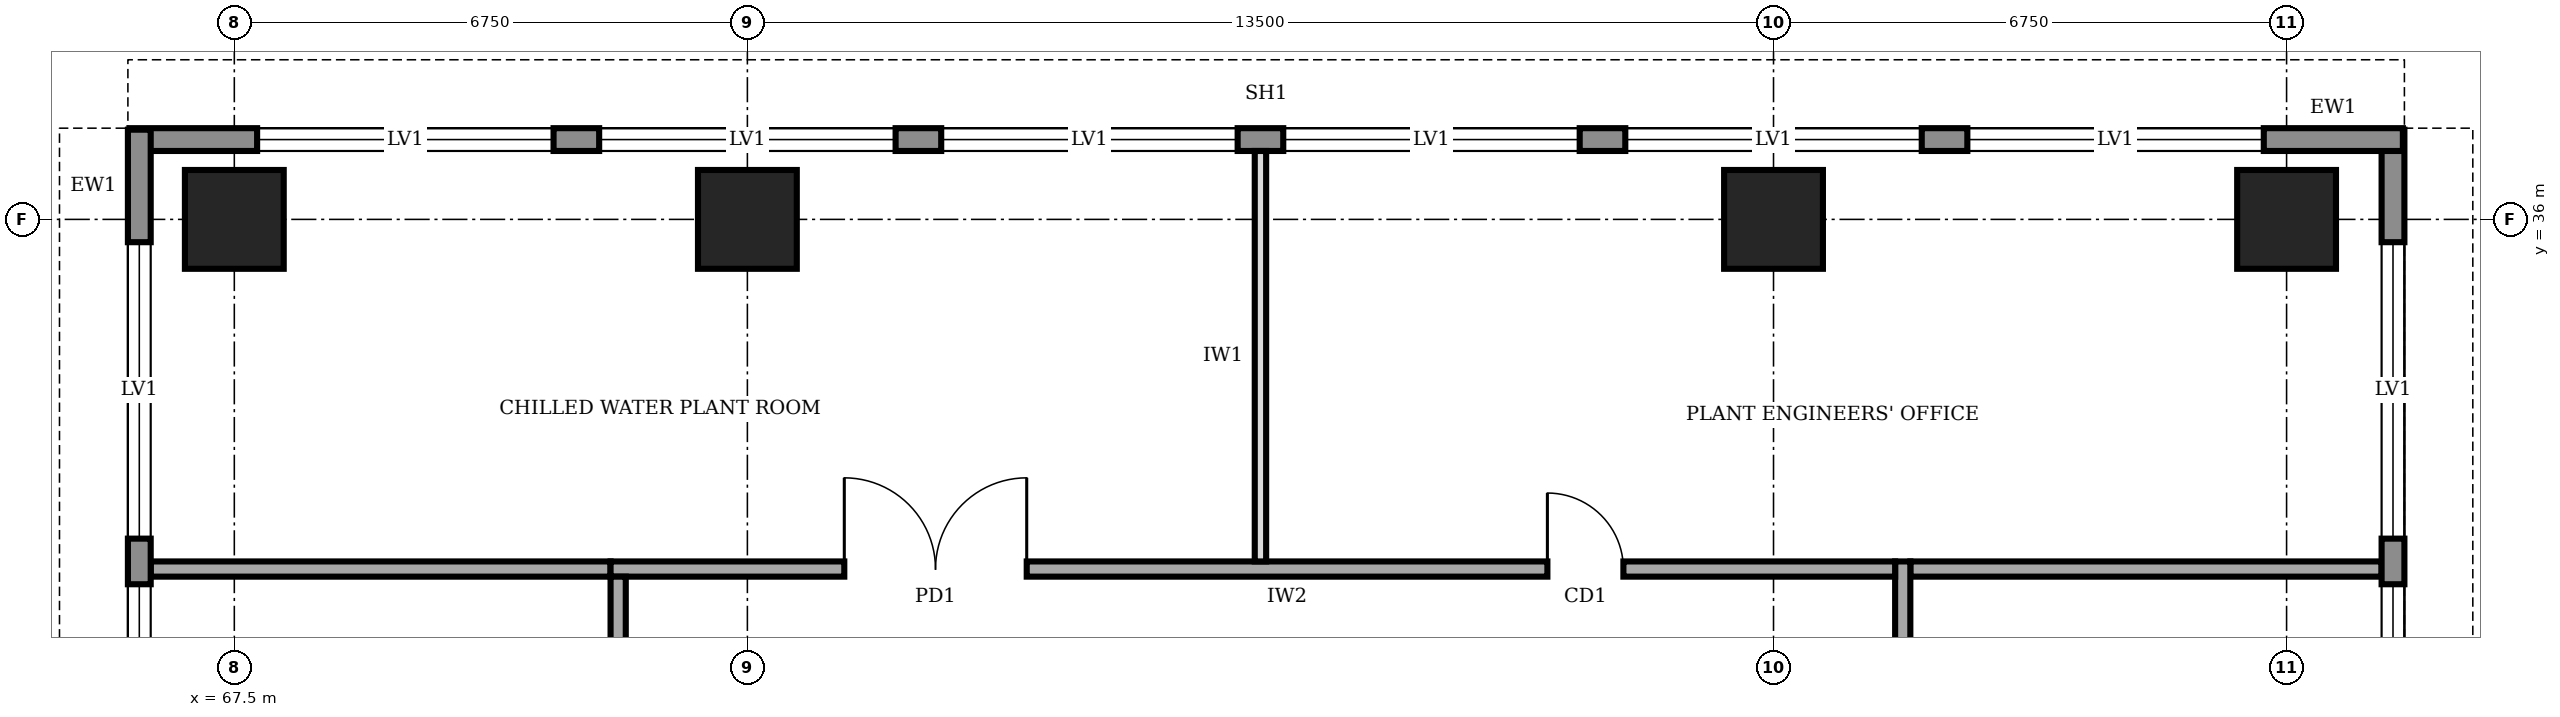
"""IFC4 building model, lengths in metres.
Left out: names, types, materials, properties, quantities, classifications, styles, units other than length and angle.
Written with IfcOpenShell. Run it as: python <this file> out.ifc"""

import sys

from ifc_helpers import new_model, si_unit, direction, frame, frame_2d, origin, origin_2d, place, context, subcontext, project, spatial, rectangle, extrude, element, fill, save


model = new_model("IFC4")
c1 = context("Model", 3, precision=1e-05, world=origin(), true_north=direction((0.0, 1.0)))
c2 = subcontext(c1, "Body", "Model", "MODEL_VIEW")
j1 = project(units=[si_unit("LENGTHUNIT", "METRE"), si_unit("PLANEANGLEUNIT", "RADIAN")], contexts=[c1])
p1 = place(None, origin())
s1 = spatial("IfcSite", under=j1, at=p1, CompositionType="ELEMENT")
p2 = place(p1, origin())
s2 = spatial("IfcBuilding", under=s1, at=p2, CompositionType="ELEMENT")
p3 = place(p2, frame((0.0, 0.0, 229.0)))
s3 = spatial("IfcBuildingStorey", under=s2, at=p3, CompositionType="ELEMENT", Elevation=229.0)
for number, where, z_axis, x_axis in (
    (1, (67.5, 36.0, 0.0), (0.0, 0.0, 1.0), (1.0, 0.0, 0.0)),
    (2, (74.25, 36.0, 0.0), (0.0, 0.0, 1.0), (1.0, 0.0, 0.0)),
    (3, (87.75, 36.0, 0.0), (0.0, 0.0, 1.0), (1.0, 0.0, 0.0)),
    (4, (94.5, 36.0, 0.0), (0.0, 0.0, 1.0), (1.0, 0.0, 0.0)),
):
    element("IfcColumn", number, at=place(p3, frame(where, z_axis=z_axis, x_axis=x_axis)), inside=s3, PredefinedType="COLUMN", context=c2, shape_type="SweptSolid", body=[
        extrude(rectangle(XDim=1.3, YDim=1.3, at=origin_2d()), origin(), (0.0, 0.0, 1.0), 4.0),
    ])
p4 = place(p3, frame((95.9, 3.32, 0.0), z_axis=(0.0, 0.0, 1.0), x_axis=(0.0, 1.0, 0.0)))
e5 = element("IfcWall", 5, at=p4, inside=s3, PredefinedType="STANDARD", context=c2, shape_type="SweptSolid", body=[
    extrude(rectangle(XDim=33.86, YDim=0.3, at=frame_2d((16.93, 0.0))), origin(), (0.0, 0.0, 1.0), 3.75),
])
p5 = place(p4, frame((1.48, 0.0, 0.9)))
e6 = element("IfcOpeningElement", 6, at=p5, cuts=e5, PredefinedType="OPENING", context=c2, shape_type="SweptSolid", body=[
    extrude(rectangle(XDim=3.9, YDim=2.2, at=frame_2d((1.95, 1.1))), frame((0.0, 0.16, 0.0), z_axis=(0.0, -1.0, 0.0), x_axis=(1.0, 0.0, 0.0)), (0.0, 0.0, 1.0), 0.32),
])
p6 = place(p4, frame((5.98, 0.0, 0.9)))
e7 = element("IfcOpeningElement", 7, at=p6, cuts=e5, PredefinedType="OPENING", context=c2, shape_type="SweptSolid", body=[
    extrude(rectangle(XDim=3.9, YDim=2.2, at=frame_2d((1.95, 1.1))), frame((0.0, 0.16, 0.0), z_axis=(0.0, -1.0, 0.0), x_axis=(1.0, 0.0, 0.0)), (0.0, 0.0, 1.0), 0.32),
])
p7 = place(p4, frame((10.48, 0.0, 0.9)))
e8 = element("IfcOpeningElement", 8, at=p7, cuts=e5, PredefinedType="OPENING", context=c2, shape_type="SweptSolid", body=[
    extrude(rectangle(XDim=3.9, YDim=2.2, at=frame_2d((1.95, 1.1))), frame((0.0, 0.16, 0.0), z_axis=(0.0, -1.0, 0.0), x_axis=(1.0, 0.0, 0.0)), (0.0, 0.0, 1.0), 0.32),
])
p8 = place(p4, frame((14.98, 0.0, 0.9)))
e9 = element("IfcOpeningElement", 9, at=p8, cuts=e5, PredefinedType="OPENING", context=c2, shape_type="SweptSolid", body=[
    extrude(rectangle(XDim=3.9, YDim=2.2, at=frame_2d((1.95, 1.1))), frame((0.0, 0.16, 0.0), z_axis=(0.0, -1.0, 0.0), x_axis=(1.0, 0.0, 0.0)), (0.0, 0.0, 1.0), 0.32),
])
p9 = place(p4, frame((19.48, 0.0, 0.9)))
e10 = element("IfcOpeningElement", 10, at=p9, cuts=e5, PredefinedType="OPENING", context=c2, shape_type="SweptSolid", body=[
    extrude(rectangle(XDim=3.9, YDim=2.2, at=frame_2d((1.95, 1.1))), frame((0.0, 0.16, 0.0), z_axis=(0.0, -1.0, 0.0), x_axis=(1.0, 0.0, 0.0)), (0.0, 0.0, 1.0), 0.32),
])
p10 = place(p4, frame((23.98, 0.0, 0.9)))
e11 = element("IfcOpeningElement", 11, at=p10, cuts=e5, PredefinedType="OPENING", context=c2, shape_type="SweptSolid", body=[
    extrude(rectangle(XDim=3.9, YDim=2.2, at=frame_2d((1.95, 1.1))), frame((0.0, 0.16, 0.0), z_axis=(0.0, -1.0, 0.0), x_axis=(1.0, 0.0, 0.0)), (0.0, 0.0, 1.0), 0.32),
])
p11 = place(p4, frame((28.48, 0.0, 0.9)))
e12 = element("IfcOpeningElement", 12, at=p11, cuts=e5, PredefinedType="OPENING", context=c2, shape_type="SweptSolid", body=[
    extrude(rectangle(XDim=3.9, YDim=2.2, at=frame_2d((1.95, 1.1))), frame((0.0, 0.16, 0.0), z_axis=(0.0, -1.0, 0.0), x_axis=(1.0, 0.0, 0.0)), (0.0, 0.0, 1.0), 0.32),
])
p12 = place(p3, frame((96.03, 37.05, 0.0), z_axis=(0.0, 0.0, 1.0), x_axis=(-1.0, 0.0, 0.0)))
e13 = element("IfcWall", 13, at=p12, inside=s3, PredefinedType="STANDARD", context=c2, shape_type="SweptSolid", body=[
    extrude(rectangle(XDim=29.91, YDim=0.3, at=frame_2d((14.955, 0.0))), origin(), (0.0, 0.0, 1.0), 3.75),
])
p13 = place(p12, frame((24.33, 0.0, 0.9)))
e14 = element("IfcOpeningElement", 14, at=p13, cuts=e13, PredefinedType="OPENING", context=c2, shape_type="SweptSolid", body=[
    extrude(rectangle(XDim=3.9, YDim=2.2, at=frame_2d((1.95, 1.1))), frame((0.0, 0.16, 0.0), z_axis=(0.0, -1.0, 0.0), x_axis=(1.0, 0.0, 0.0)), (0.0, 0.0, 1.0), 0.32),
])
p14 = place(p12, frame((19.83, 0.0, 0.9)))
e15 = element("IfcOpeningElement", 15, at=p14, cuts=e13, PredefinedType="OPENING", context=c2, shape_type="SweptSolid", body=[
    extrude(rectangle(XDim=3.9, YDim=2.2, at=frame_2d((1.95, 1.1))), frame((0.0, 0.16, 0.0), z_axis=(0.0, -1.0, 0.0), x_axis=(1.0, 0.0, 0.0)), (0.0, 0.0, 1.0), 0.32),
])
p15 = place(p12, frame((15.33, 0.0, 0.9)))
e16 = element("IfcOpeningElement", 16, at=p15, cuts=e13, PredefinedType="OPENING", context=c2, shape_type="SweptSolid", body=[
    extrude(rectangle(XDim=3.9, YDim=2.2, at=frame_2d((1.95, 1.1))), frame((0.0, 0.16, 0.0), z_axis=(0.0, -1.0, 0.0), x_axis=(1.0, 0.0, 0.0)), (0.0, 0.0, 1.0), 0.32),
])
p16 = place(p12, frame((10.83, 0.0, 0.9)))
e17 = element("IfcOpeningElement", 17, at=p16, cuts=e13, PredefinedType="OPENING", context=c2, shape_type="SweptSolid", body=[
    extrude(rectangle(XDim=3.9, YDim=2.2, at=frame_2d((1.95, 1.1))), frame((0.0, 0.16, 0.0), z_axis=(0.0, -1.0, 0.0), x_axis=(1.0, 0.0, 0.0)), (0.0, 0.0, 1.0), 0.32),
])
p17 = place(p12, frame((6.33, 0.0, 0.9)))
e18 = element("IfcOpeningElement", 18, at=p17, cuts=e13, PredefinedType="OPENING", context=c2, shape_type="SweptSolid", body=[
    extrude(rectangle(XDim=3.9, YDim=2.2, at=frame_2d((1.95, 1.1))), frame((0.0, 0.16, 0.0), z_axis=(0.0, -1.0, 0.0), x_axis=(1.0, 0.0, 0.0)), (0.0, 0.0, 1.0), 0.32),
])
p18 = place(p12, frame((1.83, 0.0, 0.9)))
e19 = element("IfcOpeningElement", 19, at=p18, cuts=e13, PredefinedType="OPENING", context=c2, shape_type="SweptSolid", body=[
    extrude(rectangle(XDim=3.9, YDim=2.2, at=frame_2d((1.95, 1.1))), frame((0.0, 0.16, 0.0), z_axis=(0.0, -1.0, 0.0), x_axis=(1.0, 0.0, 0.0)), (0.0, 0.0, 1.0), 0.32),
])
p19 = place(p3, frame((66.25, 37.18, 0.0), z_axis=(0.0, 0.0, 1.0), x_axis=(0.0, -1.0, 0.0)))
e20 = element("IfcWall", 20, at=p19, inside=s3, PredefinedType="STANDARD", context=c2, shape_type="SweptSolid", body=[
    extrude(rectangle(XDim=33.86, YDim=0.3, at=frame_2d((16.93, 0.0))), origin(), (0.0, 0.0, 1.0), 3.75),
])
p20 = place(p19, frame((28.48, 0.0, 0.9)))
e21 = element("IfcOpeningElement", 21, at=p20, cuts=e20, PredefinedType="OPENING", context=c2, shape_type="SweptSolid", body=[
    extrude(rectangle(XDim=3.9, YDim=2.2, at=frame_2d((1.95, 1.1))), frame((0.0, 0.16, 0.0), z_axis=(0.0, -1.0, 0.0), x_axis=(1.0, 0.0, 0.0)), (0.0, 0.0, 1.0), 0.32),
])
p21 = place(p19, frame((23.98, 0.0, 0.9)))
e22 = element("IfcOpeningElement", 22, at=p21, cuts=e20, PredefinedType="OPENING", context=c2, shape_type="SweptSolid", body=[
    extrude(rectangle(XDim=3.9, YDim=2.2, at=frame_2d((1.95, 1.1))), frame((0.0, 0.16, 0.0), z_axis=(0.0, -1.0, 0.0), x_axis=(1.0, 0.0, 0.0)), (0.0, 0.0, 1.0), 0.32),
])
p22 = place(p19, frame((19.48, 0.0, 0.9)))
e23 = element("IfcOpeningElement", 23, at=p22, cuts=e20, PredefinedType="OPENING", context=c2, shape_type="SweptSolid", body=[
    extrude(rectangle(XDim=3.9, YDim=2.2, at=frame_2d((1.95, 1.1))), frame((0.0, 0.16, 0.0), z_axis=(0.0, -1.0, 0.0), x_axis=(1.0, 0.0, 0.0)), (0.0, 0.0, 1.0), 0.32),
])
p23 = place(p19, frame((14.98, 0.0, 0.9)))
e24 = element("IfcOpeningElement", 24, at=p23, cuts=e20, PredefinedType="OPENING", context=c2, shape_type="SweptSolid", body=[
    extrude(rectangle(XDim=3.9, YDim=2.2, at=frame_2d((1.95, 1.1))), frame((0.0, 0.16, 0.0), z_axis=(0.0, -1.0, 0.0), x_axis=(1.0, 0.0, 0.0)), (0.0, 0.0, 1.0), 0.32),
])
p24 = place(p19, frame((10.48, 0.0, 0.9)))
e25 = element("IfcOpeningElement", 25, at=p24, cuts=e20, PredefinedType="OPENING", context=c2, shape_type="SweptSolid", body=[
    extrude(rectangle(XDim=3.9, YDim=2.2, at=frame_2d((1.95, 1.1))), frame((0.0, 0.16, 0.0), z_axis=(0.0, -1.0, 0.0), x_axis=(1.0, 0.0, 0.0)), (0.0, 0.0, 1.0), 0.32),
])
p25 = place(p19, frame((5.98, 0.0, 0.9)))
e26 = element("IfcOpeningElement", 26, at=p25, cuts=e20, PredefinedType="OPENING", context=c2, shape_type="SweptSolid", body=[
    extrude(rectangle(XDim=3.9, YDim=2.2, at=frame_2d((1.95, 1.1))), frame((0.0, 0.16, 0.0), z_axis=(0.0, -1.0, 0.0), x_axis=(1.0, 0.0, 0.0)), (0.0, 0.0, 1.0), 0.32),
])
p26 = place(p19, frame((1.48, 0.0, 0.9)))
e27 = element("IfcOpeningElement", 27, at=p26, cuts=e20, PredefinedType="OPENING", context=c2, shape_type="SweptSolid", body=[
    extrude(rectangle(XDim=3.9, YDim=2.2, at=frame_2d((1.95, 1.1))), frame((0.0, 0.16, 0.0), z_axis=(0.0, -1.0, 0.0), x_axis=(1.0, 0.0, 0.0)), (0.0, 0.0, 1.0), 0.32),
])
p27 = place(p3, frame((89.45, 9.2, 0.0), z_axis=(0.0, 0.0, 1.0), x_axis=(0.0, 1.0, 0.0)))
e28 = element("IfcWall", 28, at=p27, inside=s3, PredefinedType="SOLIDWALL", context=c2, shape_type="SweptSolid", body=[
    extrude(rectangle(XDim=22.3, YDim=0.2, at=frame_2d((11.15, 0.0))), origin(), (0.0, 0.0, 1.0), 3.75),
])
p28 = place(p27, frame((1.55, 0.0, 0.0)))
e29 = element("IfcOpeningElement", 29, at=p28, cuts=e28, PredefinedType="OPENING", context=c2, shape_type="SweptSolid", body=[
    extrude(rectangle(XDim=1.0, YDim=2.1, at=frame_2d((0.5, 1.05))), frame((0.0, 0.11, 0.0), z_axis=(0.0, -1.0, 0.0), x_axis=(1.0, 0.0, 0.0)), (0.0, 0.0, 1.0), 0.22),
])
p29 = place(p27, frame((5.75, 0.0, 0.0)))
e30 = element("IfcOpeningElement", 30, at=p29, cuts=e28, PredefinedType="OPENING", context=c2, shape_type="SweptSolid", body=[
    extrude(rectangle(XDim=0.9, YDim=2.1, at=frame_2d((0.45, 1.05))), frame((0.0, 0.11, 0.0), z_axis=(0.0, -1.0, 0.0), x_axis=(1.0, 0.0, 0.0)), (0.0, 0.0, 1.0), 0.22),
])
p30 = place(p27, frame((8.75, 0.0, 0.0)))
e31 = element("IfcOpeningElement", 31, at=p30, cuts=e28, PredefinedType="OPENING", context=c2, shape_type="SweptSolid", body=[
    extrude(rectangle(XDim=0.9, YDim=2.1, at=frame_2d((0.45, 1.05))), frame((0.0, 0.11, 0.0), z_axis=(0.0, -1.0, 0.0), x_axis=(1.0, 0.0, 0.0)), (0.0, 0.0, 1.0), 0.22),
])
p31 = place(p27, frame((13.6, 0.0, 0.0)))
e32 = element("IfcOpeningElement", 32, at=p31, cuts=e28, PredefinedType="OPENING", context=c2, shape_type="SweptSolid", body=[
    extrude(rectangle(XDim=0.9, YDim=2.1, at=frame_2d((0.45, 1.05))), frame((0.0, 0.11, 0.0), z_axis=(0.0, -1.0, 0.0), x_axis=(1.0, 0.0, 0.0)), (0.0, 0.0, 1.0), 0.22),
])
p32 = place(p27, frame((16.3, 0.0, 0.0)))
e33 = element("IfcOpeningElement", 33, at=p32, cuts=e28, PredefinedType="OPENING", context=c2, shape_type="SweptSolid", body=[
    extrude(rectangle(XDim=1.0, YDim=2.1, at=frame_2d((0.5, 1.05))), frame((0.0, 0.11, 0.0), z_axis=(0.0, -1.0, 0.0), x_axis=(1.0, 0.0, 0.0)), (0.0, 0.0, 1.0), 0.22),
])
p33 = place(p27, frame((10.8, 0.0, 0.0)))
e34 = element("IfcOpeningElement", 34, at=p33, cuts=e28, PredefinedType="OPENING", context=c2, shape_type="SweptSolid", body=[
    extrude(rectangle(XDim=1.0, YDim=2.1, at=frame_2d((0.5, 1.05))), frame((0.0, 0.11, 0.0), z_axis=(0.0, -1.0, 0.0), x_axis=(1.0, 0.0, 0.0)), (0.0, 0.0, 1.0), 0.22),
])
p34 = place(p27, frame((19.55, 0.0, 0.0)))
e35 = element("IfcOpeningElement", 35, at=p34, cuts=e28, PredefinedType="OPENING", context=c2, shape_type="SweptSolid", body=[
    extrude(rectangle(XDim=1.0, YDim=2.1, at=frame_2d((0.5, 1.05))), frame((0.0, 0.11, 0.0), z_axis=(0.0, -1.0, 0.0), x_axis=(1.0, 0.0, 0.0)), (0.0, 0.0, 1.0), 0.22),
])
p35 = place(p3, frame((89.35, 31.4, 0.0), z_axis=(0.0, 0.0, 1.0), x_axis=(-1.0, 0.0, 0.0)))
e36 = element("IfcWall", 36, at=p35, inside=s3, PredefinedType="SOLIDWALL", context=c2, shape_type="SweptSolid", body=[
    extrude(rectangle(XDim=16.9, YDim=0.2, at=frame_2d((8.45, 0.0))), origin(), (0.0, 0.0, 1.0), 3.75),
])
p36 = place(p35, frame((11.425, 0.0, 0.0)))
e37 = element("IfcOpeningElement", 37, at=p36, cuts=e36, PredefinedType="OPENING", context=c2, shape_type="SweptSolid", body=[
    extrude(rectangle(XDim=2.4, YDim=2.7, at=frame_2d((1.2, 1.35))), frame((0.0, 0.11, 0.0), z_axis=(0.0, -1.0, 0.0), x_axis=(1.0, 0.0, 0.0)), (0.0, 0.0, 1.0), 0.22),
])
p37 = place(p35, frame((3.575, 0.0, 0.0)))
e38 = element("IfcOpeningElement", 38, at=p37, cuts=e36, PredefinedType="OPENING", context=c2, shape_type="SweptSolid", body=[
    extrude(rectangle(XDim=1.0, YDim=2.1, at=frame_2d((0.5, 1.05))), frame((0.0, 0.11, 0.0), z_axis=(0.0, -1.0, 0.0), x_axis=(1.0, 0.0, 0.0)), (0.0, 0.0, 1.0), 0.22),
])
p38 = place(p3, frame((72.55, 31.3, 0.0), z_axis=(0.0, 0.0, 1.0), x_axis=(0.0, -1.0, 0.0)))
e39 = element("IfcWall", 39, at=p38, inside=s3, PredefinedType="SOLIDWALL", context=c2, shape_type="SweptSolid", body=[
    extrude(rectangle(XDim=22.3, YDim=0.2, at=frame_2d((11.15, 0.0))), origin(), (0.0, 0.0, 1.0), 3.75),
])
p39 = place(p38, frame((10.05, 0.0, 0.0)))
e40 = element("IfcOpeningElement", 40, at=p39, cuts=e39, PredefinedType="OPENING", context=c2, shape_type="SweptSolid", body=[
    extrude(rectangle(XDim=2.0, YDim=2.1, at=frame_2d((1.0, 1.05))), frame((0.0, 0.11, 0.0), z_axis=(0.0, -1.0, 0.0), x_axis=(1.0, 0.0, 0.0)), (0.0, 0.0, 1.0), 0.22),
])
p40 = place(p3, frame((66.4, 31.4, 0.0), z_axis=(0.0, 0.0, 1.0), x_axis=(1.0, 0.0, 0.0)))
e41 = element("IfcWall", 41, at=p40, inside=s3, PredefinedType="SOLIDWALL", context=c2, shape_type="SweptSolid", body=[
    extrude(rectangle(XDim=6.05, YDim=0.2, at=frame_2d((3.025, 0.0))), origin(), (0.0, 0.0, 1.0), 3.75),
])
p41 = place(p3, frame((89.55, 31.4, 0.0), z_axis=(0.0, 0.0, 1.0), x_axis=(1.0, 0.0, 0.0)))
e42 = element("IfcWall", 42, at=p41, inside=s3, PredefinedType="SOLIDWALL", context=c2, shape_type="SweptSolid", body=[
    extrude(rectangle(XDim=6.2, YDim=0.2, at=frame_2d((3.1, 0.0))), origin(), (0.0, 0.0, 1.0), 3.75),
])
p42 = place(p3, frame((81.0, 31.5, 0.0), z_axis=(0.0, 0.0, 1.0), x_axis=(0.0, 1.0, 0.0)))
e43 = element("IfcWall", 43, at=p42, inside=s3, PredefinedType="PARTITIONING", context=c2, shape_type="SweptSolid", body=[
    extrude(rectangle(XDim=5.4, YDim=0.15, at=frame_2d((2.7, 0.0))), origin(), (0.0, 0.0, 1.0), 3.75),
])
p43 = place(p10, origin())
e44 = element("IfcWindow", 44, at=p43, inside=s3, PartitioningType="SINGLE_PANEL", PredefinedType="WINDOW", context=c2, shape_type="SweptSolid", body=[
    extrude(rectangle(XDim=3.9, YDim=2.2, at=frame_2d((1.95, 1.1))), frame((0.0, 0.03, 0.0), z_axis=(0.0, -1.0, 0.0), x_axis=(1.0, 0.0, 0.0)), (0.0, 0.0, 1.0), 0.06),
])
fill(e11, e44)
p44 = place(p11, origin())
e45 = element("IfcWindow", 45, at=p44, inside=s3, PartitioningType="SINGLE_PANEL", PredefinedType="WINDOW", context=c2, shape_type="SweptSolid", body=[
    extrude(rectangle(XDim=3.9, YDim=2.2, at=frame_2d((1.95, 1.1))), frame((0.0, 0.03, 0.0), z_axis=(0.0, -1.0, 0.0), x_axis=(1.0, 0.0, 0.0)), (0.0, 0.0, 1.0), 0.06),
])
fill(e12, e45)
p45 = place(p13, origin())
e46 = element("IfcWindow", 46, at=p45, inside=s3, PartitioningType="SINGLE_PANEL", PredefinedType="WINDOW", context=c2, shape_type="SweptSolid", body=[
    extrude(rectangle(XDim=3.9, YDim=2.2, at=frame_2d((1.95, 1.1))), frame((0.0, 0.03, 0.0), z_axis=(0.0, -1.0, 0.0), x_axis=(1.0, 0.0, 0.0)), (0.0, 0.0, 1.0), 0.06),
])
fill(e14, e46)
p46 = place(p14, origin())
e47 = element("IfcWindow", 47, at=p46, inside=s3, PartitioningType="SINGLE_PANEL", PredefinedType="WINDOW", context=c2, shape_type="SweptSolid", body=[
    extrude(rectangle(XDim=3.9, YDim=2.2, at=frame_2d((1.95, 1.1))), frame((0.0, 0.03, 0.0), z_axis=(0.0, -1.0, 0.0), x_axis=(1.0, 0.0, 0.0)), (0.0, 0.0, 1.0), 0.06),
])
fill(e15, e47)
p47 = place(p15, origin())
e48 = element("IfcWindow", 48, at=p47, inside=s3, PartitioningType="SINGLE_PANEL", PredefinedType="WINDOW", context=c2, shape_type="SweptSolid", body=[
    extrude(rectangle(XDim=3.9, YDim=2.2, at=frame_2d((1.95, 1.1))), frame((0.0, 0.03, 0.0), z_axis=(0.0, -1.0, 0.0), x_axis=(1.0, 0.0, 0.0)), (0.0, 0.0, 1.0), 0.06),
])
fill(e16, e48)
p48 = place(p16, origin())
e49 = element("IfcWindow", 49, at=p48, inside=s3, PartitioningType="SINGLE_PANEL", PredefinedType="WINDOW", context=c2, shape_type="SweptSolid", body=[
    extrude(rectangle(XDim=3.9, YDim=2.2, at=frame_2d((1.95, 1.1))), frame((0.0, 0.03, 0.0), z_axis=(0.0, -1.0, 0.0), x_axis=(1.0, 0.0, 0.0)), (0.0, 0.0, 1.0), 0.06),
])
fill(e17, e49)
p49 = place(p17, origin())
e50 = element("IfcWindow", 50, at=p49, inside=s3, PartitioningType="SINGLE_PANEL", PredefinedType="WINDOW", context=c2, shape_type="SweptSolid", body=[
    extrude(rectangle(XDim=3.9, YDim=2.2, at=frame_2d((1.95, 1.1))), frame((0.0, 0.03, 0.0), z_axis=(0.0, -1.0, 0.0), x_axis=(1.0, 0.0, 0.0)), (0.0, 0.0, 1.0), 0.06),
])
fill(e18, e50)
p50 = place(p18, origin())
e51 = element("IfcWindow", 51, at=p50, inside=s3, PartitioningType="SINGLE_PANEL", PredefinedType="WINDOW", context=c2, shape_type="SweptSolid", body=[
    extrude(rectangle(XDim=3.9, YDim=2.2, at=frame_2d((1.95, 1.1))), frame((0.0, 0.03, 0.0), z_axis=(0.0, -1.0, 0.0), x_axis=(1.0, 0.0, 0.0)), (0.0, 0.0, 1.0), 0.06),
])
fill(e19, e51)
p51 = place(p25, origin())
e52 = element("IfcWindow", 52, at=p51, inside=s3, PartitioningType="SINGLE_PANEL", PredefinedType="WINDOW", context=c2, shape_type="SweptSolid", body=[
    extrude(rectangle(XDim=3.9, YDim=2.2, at=frame_2d((1.95, 1.1))), frame((0.0, 0.03, 0.0), z_axis=(0.0, -1.0, 0.0), x_axis=(1.0, 0.0, 0.0)), (0.0, 0.0, 1.0), 0.06),
])
fill(e26, e52)
p52 = place(p26, origin())
e53 = element("IfcWindow", 53, at=p52, inside=s3, PartitioningType="SINGLE_PANEL", PredefinedType="WINDOW", context=c2, shape_type="SweptSolid", body=[
    extrude(rectangle(XDim=3.9, YDim=2.2, at=frame_2d((1.95, 1.1))), frame((0.0, 0.03, 0.0), z_axis=(0.0, -1.0, 0.0), x_axis=(1.0, 0.0, 0.0)), (0.0, 0.0, 1.0), 0.06),
])
fill(e27, e53)
p53 = place(p36, frame((2.4, 0.0, 0.0), z_axis=(0.0, 0.0, 1.0), x_axis=(-1.0, 0.0, 0.0)))
e54 = element("IfcDoor", 54, at=p53, inside=s3, OperationType="DOUBLE_DOOR_SINGLE_SWING", PredefinedType="DOOR", context=c2, shape_type="SweptSolid", body=[
    extrude(rectangle(XDim=2.4, YDim=2.7, at=frame_2d((1.2, 1.35))), frame((0.0, 0.025, 0.0), z_axis=(0.0, -1.0, 0.0), x_axis=(1.0, 0.0, 0.0)), (0.0, 0.0, 1.0), 0.05),
])
fill(e37, e54)
p54 = place(p37, frame((1.0, 0.0, 0.0), z_axis=(0.0, 0.0, 1.0), x_axis=(-1.0, 0.0, 0.0)))
e55 = element("IfcDoor", 55, at=p54, inside=s3, OperationType="SINGLE_SWING_LEFT", PredefinedType="DOOR", context=c2, shape_type="SweptSolid", body=[
    extrude(rectangle(XDim=1.0, YDim=2.1, at=frame_2d((0.5, 1.05))), frame((0.0, 0.025, 0.0), z_axis=(0.0, -1.0, 0.0), x_axis=(1.0, 0.0, 0.0)), (0.0, 0.0, 1.0), 0.05),
])
fill(e38, e55)
save(model, sys.argv[1])
